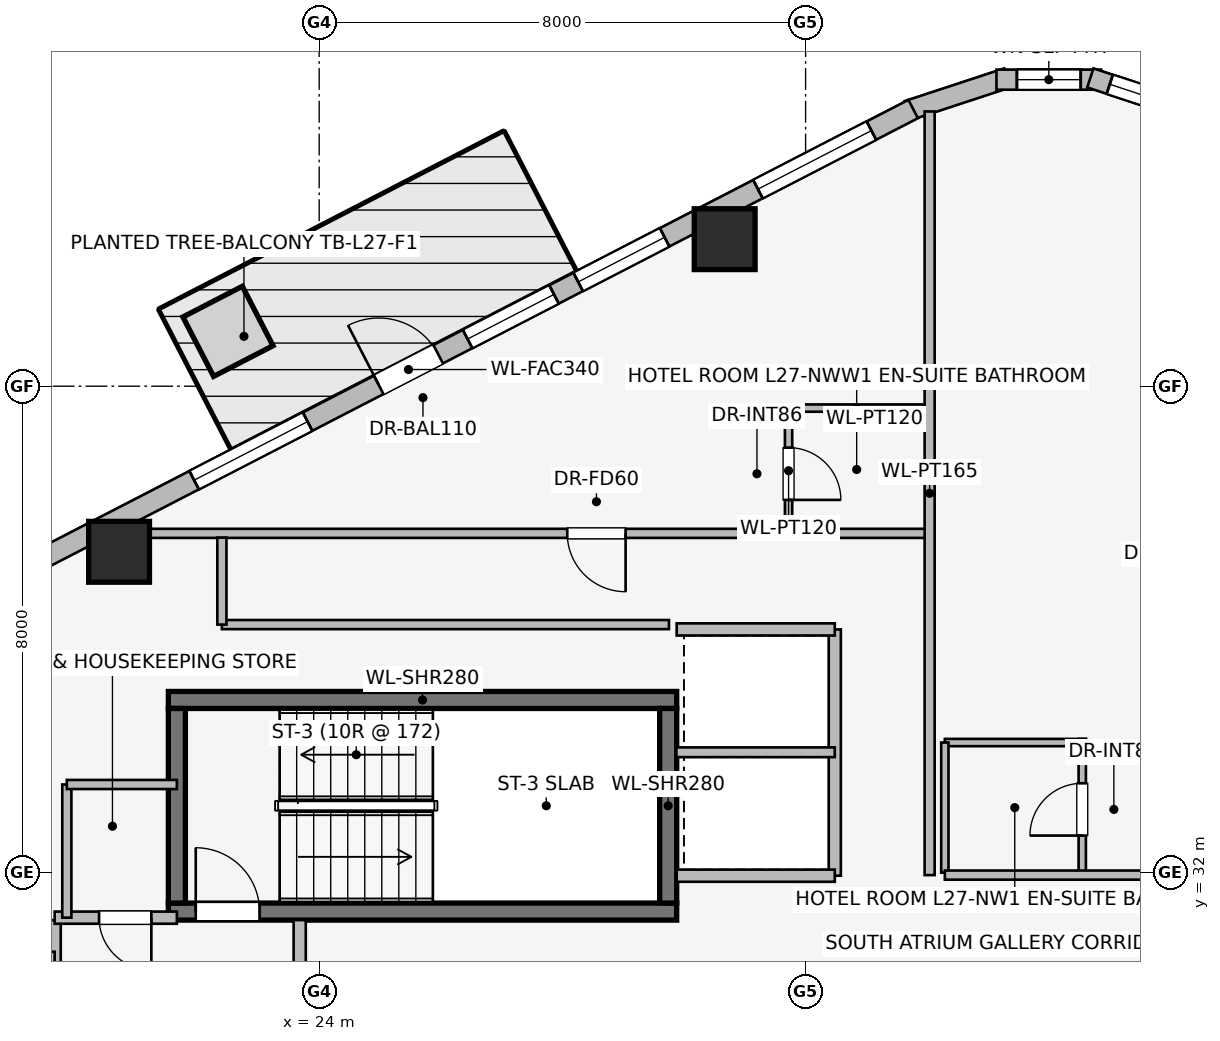
"""IFC4 building model, lengths in metres.
Left out: names, types, materials, properties, quantities, classifications, styles, units other than length and angle.
Written with IfcOpenShell. Run it as: python <this file> out.ifc"""

import sys

from ifc_helpers import new_model, si_unit, direction, frame, frame_2d, origin, origin_2d, place, context, subcontext, project, spatial, rectangle, extrude, element, fill, save


model = new_model("IFC4")
c1 = context("Model", 3, precision=1e-05, world=origin(), true_north=direction((0.0, 1.0)))
c2 = subcontext(c1, "Body", "Model", "MODEL_VIEW")
j1 = project(units=[si_unit("LENGTHUNIT", "METRE"), si_unit("PLANEANGLEUNIT", "RADIAN")], contexts=[c1])
p1 = place(None, origin())
s1 = spatial("IfcSite", under=j1, at=p1, CompositionType="ELEMENT")
p2 = place(p1, origin())
s2 = spatial("IfcBuilding", under=s1, at=p2, CompositionType="ELEMENT")
p3 = place(p2, frame((0.0, 0.0, 105.0)))
s3 = spatial("IfcBuildingStorey", under=s2, at=p3, CompositionType="ELEMENT", Elevation=105.0)
p4 = place(p3, frame((21.52, 31.36, 0.0), z_axis=(0.0, 0.0, 1.0), x_axis=(1.0, 0.0, 0.0)))
e1 = element("IfcWall", 1, at=p4, inside=s3, PredefinedType="SHEAR", context=c2, shape_type="SweptSolid", body=[
    extrude(rectangle(XDim=8.36, YDim=0.28, at=frame_2d((4.18, 0.0))), origin(), (0.0, 0.0, 1.0), 3.45),
])
p5 = place(p4, frame((0.45, 0.0, 0.0)))
e2 = element("IfcOpeningElement", 2, at=p5, cuts=e1, PredefinedType="OPENING", context=c2, shape_type="SweptSolid", body=[
    extrude(rectangle(XDim=1.05, YDim=2.0, at=frame_2d((0.525, 1.0))), frame((0.0, 0.15, 0.0), z_axis=(0.0, -1.0, 0.0), x_axis=(1.0, 0.0, 0.0)), (0.0, 0.0, 1.0), 0.3),
])
p6 = place(p3, frame((29.88, 34.84, 0.0), z_axis=(0.0, 0.0, 1.0), x_axis=(-1.0, 0.0, 0.0)))
e3 = element("IfcWall", 3, at=p6, inside=s3, PredefinedType="SHEAR", context=c2, shape_type="SweptSolid", body=[
    extrude(rectangle(XDim=8.36, YDim=0.28, at=frame_2d((4.18, 0.0))), origin(), (0.0, 0.0, 1.0), 3.45),
])
for number, where, z_axis, x_axis in (
    (4, (21.66, 34.7, 0.0), (0.0, 0.0, 1.0), (0.0, -1.0, 0.0)),
    (5, (29.74, 31.5, 0.0), (0.0, 0.0, 1.0), (0.0, 1.0, 0.0)),
):
    element("IfcWall", number, at=place(p3, frame(where, z_axis=z_axis, x_axis=x_axis)), inside=s3, PredefinedType="SHEAR", context=c2, shape_type="SweptSolid", body=[
        extrude(rectangle(XDim=3.2, YDim=0.28, at=frame_2d((1.6, 0.0))), origin(), (0.0, 0.0, 1.0), 3.45),
    ])
for number, where, z_axis, x_axis in (
    (6, (30.669, 42.418, 0.0), (0.0, 0.0, 1.0), (1.0, 0.0, 0.0)),
    (7, (20.709, 37.277, 0.0), (0.0, 0.0, 1.0), (1.0, 0.0, 0.0)),
):
    element("IfcColumn", number, at=place(p3, frame(where, z_axis=z_axis, x_axis=x_axis)), inside=s3, PredefinedType="COLUMN", context=c2, shape_type="SweptSolid", body=[
        extrude(rectangle(XDim=1.0, YDim=1.0, at=origin_2d()), origin(), (0.0, 0.0, 1.0), 3.45),
    ])
p7 = place(p3, frame((33.681, 44.532, 0.0), z_axis=(0.0, 0.0, 1.0), x_axis=(0.949937416267, 0.312440242569, 0.0)))
e8 = element("IfcWall", 8, at=p7, inside=s3, PredefinedType="STANDARD", context=c2, shape_type="SweptSolid", body=[
    extrude(rectangle(XDim=1.722, YDim=0.33, at=frame_2d((0.861, 0.0))), origin(), (0.0, 0.0, 1.0), 3.19),
])
p8 = place(p3, frame((35.139, 45.041, 0.0), z_axis=(0.0, 0.0, 1.0), x_axis=(1.0, 0.0, 0.0)))
e9 = element("IfcWall", 9, at=p8, inside=s3, PredefinedType="STANDARD", context=c2, shape_type="SweptSolid", body=[
    extrude(rectangle(XDim=1.722, YDim=0.33, at=frame_2d((0.861, 0.0))), origin(), (0.0, 0.0, 1.0), 3.19),
])
p9 = place(p8, frame((0.336, 0.0, 0.75)))
e10 = element("IfcOpeningElement", 10, at=p9, cuts=e9, PredefinedType="OPENING", context=c2, shape_type="SweptSolid", body=[
    extrude(rectangle(XDim=1.05, YDim=1.4, at=frame_2d((0.525, 0.7))), frame((0.0, 0.175, 0.0), z_axis=(0.0, -1.0, 0.0), x_axis=(1.0, 0.0, 0.0)), (0.0, 0.0, 1.0), 0.35),
])
p10 = place(p3, frame((36.683, 45.07, 0.0), z_axis=(0.0, 0.0, 1.0), x_axis=(0.949937416267, -0.312440242569, 0.0)))
e11 = element("IfcWall", 11, at=p10, inside=s3, PredefinedType="STANDARD", context=c2, shape_type="SweptSolid", body=[
    extrude(rectangle(XDim=1.722, YDim=0.33, at=frame_2d((0.861, 0.0))), origin(), (0.0, 0.0, 1.0), 3.19),
])
p11 = place(p10, frame((0.336, 0.0, 0.75)))
e12 = element("IfcOpeningElement", 12, at=p11, cuts=e11, PredefinedType="OPENING", context=c2, shape_type="SweptSolid", body=[
    extrude(rectangle(XDim=1.05, YDim=1.4, at=frame_2d((0.525, 0.7))), frame((0.0, 0.175, 0.0), z_axis=(0.0, -1.0, 0.0), x_axis=(1.0, 0.0, 0.0)), (0.0, 0.0, 1.0), 0.35),
])
p12 = place(p3, frame((17.169, 35.99, 0.0), z_axis=(0.0, 0.0, 1.0), x_axis=(0.888613612362, 0.458656568606, 0.0)))
e13 = element("IfcWall", 13, at=p12, inside=s3, PredefinedType="STANDARD", context=c2, shape_type="SweptSolid", body=[
    extrude(rectangle(XDim=18.681, YDim=0.34, at=frame_2d((9.34, 0.0))), origin(), (0.0, 0.0, 1.0), 3.19),
])
p13 = place(p12, frame((8.79, 0.0, 0.0)))
e14 = element("IfcOpeningElement", 14, at=p13, cuts=e13, PredefinedType="OPENING", context=c2, shape_type="SweptSolid", body=[
    extrude(rectangle(XDim=1.1, YDim=2.04, at=frame_2d((0.55, 1.02))), frame((0.0, 0.18, 0.0), z_axis=(0.0, -1.0, 0.0), x_axis=(1.0, 0.0, 0.0)), (0.0, 0.0, 1.0), 0.36),
])
p14 = place(p12, frame((1.023, 0.0, 0.75)))
e15 = element("IfcOpeningElement", 15, at=p14, cuts=e13, PredefinedType="OPENING", context=c2, shape_type="SweptSolid", body=[
    extrude(rectangle(XDim=1.6, YDim=1.55, at=frame_2d((0.8, 0.775))), frame((0.0, 0.18, 0.0), z_axis=(0.0, -1.0, 0.0), x_axis=(1.0, 0.0, 0.0)), (0.0, 0.0, 1.0), 0.36),
])
p15 = place(p12, frame((5.373, 0.0, 0.75)))
e16 = element("IfcOpeningElement", 16, at=p15, cuts=e13, PredefinedType="OPENING", context=c2, shape_type="SweptSolid", body=[
    extrude(rectangle(XDim=2.1, YDim=1.5, at=frame_2d((1.05, 0.75))), frame((0.0, 0.18, 0.0), z_axis=(0.0, -1.0, 0.0), x_axis=(1.0, 0.0, 0.0)), (0.0, 0.0, 1.0), 0.36),
])
p16 = place(p12, frame((10.434, 0.0, 0.75)))
e17 = element("IfcOpeningElement", 17, at=p16, cuts=e13, PredefinedType="OPENING", context=c2, shape_type="SweptSolid", body=[
    extrude(rectangle(XDim=1.6, YDim=1.55, at=frame_2d((0.8, 0.775))), frame((0.0, 0.18, 0.0), z_axis=(0.0, -1.0, 0.0), x_axis=(1.0, 0.0, 0.0)), (0.0, 0.0, 1.0), 0.36),
])
p17 = place(p12, frame((12.481, 0.0, 0.75)))
e18 = element("IfcOpeningElement", 18, at=p17, cuts=e13, PredefinedType="OPENING", context=c2, shape_type="SweptSolid", body=[
    extrude(rectangle(XDim=1.6, YDim=1.55, at=frame_2d((0.8, 0.775))), frame((0.0, 0.18, 0.0), z_axis=(0.0, -1.0, 0.0), x_axis=(1.0, 0.0, 0.0)), (0.0, 0.0, 1.0), 0.36),
])
p18 = place(p12, frame((15.808, 0.0, 0.75)))
e19 = element("IfcOpeningElement", 19, at=p18, cuts=e13, PredefinedType="OPENING", context=c2, shape_type="SweptSolid", body=[
    extrude(rectangle(XDim=2.1, YDim=1.5, at=frame_2d((1.05, 0.75))), frame((0.0, 0.18, 0.0), z_axis=(0.0, -1.0, 0.0), x_axis=(1.0, 0.0, 0.0)), (0.0, 0.0, 1.0), 0.36),
])
p19 = place(p3, frame((19.65, 25.68, 0.0), z_axis=(0.0, 0.0, 1.0), x_axis=(0.0, 1.0, 0.0)))
e20 = element("IfcWall", 20, at=p19, inside=s3, PredefinedType="PARTITIONING", context=c2, shape_type="SweptSolid", body=[
    extrude(rectangle(XDim=5.54, YDim=0.2, at=frame_2d((2.77, 0.0))), origin(), (0.0, 0.0, 1.0), 3.19),
])
p20 = place(p19, frame((0.62, 0.0, 0.0)))
e21 = element("IfcOpeningElement", 21, at=p20, cuts=e20, PredefinedType="OPENING", context=c2, shape_type="SweptSolid", body=[
    extrude(rectangle(XDim=1.1, YDim=2.2, at=frame_2d((0.55, 1.1))), frame((0.0, 0.11, 0.0), z_axis=(0.0, -1.0, 0.0), x_axis=(1.0, 0.0, 0.0)), (0.0, 0.0, 1.0), 0.22),
])
p21 = place(p19, frame((3.12, 0.0, 0.0)))
e22 = element("IfcOpeningElement", 22, at=p21, cuts=e20, PredefinedType="OPENING", context=c2, shape_type="SweptSolid", body=[
    extrude(rectangle(XDim=1.1, YDim=2.2, at=frame_2d((0.55, 1.1))), frame((0.0, 0.11, 0.0), z_axis=(0.0, -1.0, 0.0), x_axis=(1.0, 0.0, 0.0)), (0.0, 0.0, 1.0), 0.22),
])
p22 = place(p3, frame((23.68, 25.68, 0.0), z_axis=(0.0, 0.0, 1.0), x_axis=(0.0, 1.0, 0.0)))
e23 = element("IfcWall", 23, at=p22, inside=s3, PredefinedType="PARTITIONING", context=c2, shape_type="SweptSolid", body=[
    extrude(rectangle(XDim=5.54, YDim=0.2, at=frame_2d((2.77, 0.0))), origin(), (0.0, 0.0, 1.0), 3.19),
])
p23 = place(p22, frame((1.8, 0.0, 0.0)))
e24 = element("IfcOpeningElement", 24, at=p23, cuts=e23, PredefinedType="OPENING", context=c2, shape_type="SweptSolid", body=[
    extrude(rectangle(XDim=1.05, YDim=2.0, at=frame_2d((0.525, 1.0))), frame((0.0, 0.11, 0.0), z_axis=(0.0, -1.0, 0.0), x_axis=(1.0, 0.0, 0.0)), (0.0, 0.0, 1.0), 0.22),
])
p24 = place(p3, frame((21.66, 31.26, 0.0), z_axis=(0.0, 0.0, 1.0), x_axis=(-1.0, 0.0, 0.0)))
e25 = element("IfcWall", 25, at=p24, inside=s3, PredefinedType="PARTITIONING", context=c2, shape_type="SweptSolid", body=[
    extrude(rectangle(XDim=2.01, YDim=0.2, at=frame_2d((1.005, 0.0))), origin(), (0.0, 0.0, 1.0), 3.19),
])
p25 = place(p24, frame((0.42, 0.0, 0.0)))
e26 = element("IfcOpeningElement", 26, at=p25, cuts=e25, PredefinedType="OPENING", context=c2, shape_type="SweptSolid", body=[
    extrude(rectangle(XDim=0.86, YDim=2.0, at=frame_2d((0.43, 1.0))), frame((0.0, 0.11, 0.0), z_axis=(0.0, -1.0, 0.0), x_axis=(1.0, 0.0, 0.0)), (0.0, 0.0, 1.0), 0.22),
])
p26 = place(p3, frame((19.65, 30.6, 0.0), z_axis=(0.0, 0.0, 1.0), x_axis=(-1.0, 0.0, 0.0)))
e27 = element("IfcWall", 27, at=p26, inside=s3, PredefinedType="PARTITIONING", context=c2, shape_type="SweptSolid", body=[
    extrude(rectangle(XDim=2.5, YDim=0.2, at=frame_2d((1.25, 0.0))), origin(), (0.0, 0.0, 1.0), 2.09),
])
p27 = place(p3, frame((32.48, 31.95, 0.0), z_axis=(0.0, 0.0, 1.0), x_axis=(0.0, 1.0, 0.0)))
e28 = element("IfcWall", 28, at=p27, inside=s3, PredefinedType="PARTITIONING", context=c2, shape_type="SweptSolid", body=[
    extrude(rectangle(XDim=4.05, YDim=0.2, at=frame_2d((2.025, 0.0))), origin(), (0.0, 0.0, 1.0), 3.19),
])
for number, where, z_axis, x_axis in (
    (29, (29.88, 36.0, 0.0), (0.0, 0.0, 1.0), (1.0, 0.0, 0.0)),
    (30, (32.48, 31.95, 0.0), (0.0, 0.0, 1.0), (-1.0, 0.0, 0.0)),
):
    element("IfcWall", number, at=place(p3, frame(where, z_axis=z_axis, x_axis=x_axis)), inside=s3, PredefinedType="PARTITIONING", context=c2, shape_type="SweptSolid", body=[
        extrude(rectangle(XDim=2.6, YDim=0.2, at=frame_2d((1.3, 0.0))), origin(), (0.0, 0.0, 1.0), 3.19),
    ])
p28 = place(p3, frame((29.875, 33.98, 0.0), z_axis=(0.0, 0.0, 1.0), x_axis=(1.0, 0.0, 0.0)))
e31 = element("IfcWall", 31, at=p28, inside=s3, PredefinedType="PARTITIONING", context=c2, shape_type="SweptSolid", body=[
    extrude(rectangle(XDim=2.605, YDim=0.16, at=frame_2d((1.302, 0.0))), origin(), (0.0, 0.0, 1.0), 3.19),
])
p29 = place(p3, frame((19.85, 33.45, 0.0), z_axis=(0.0, 0.0, 1.0), x_axis=(0.0, -1.0, 0.0)))
e32 = element("IfcWall", 32, at=p29, inside=s3, PredefinedType="PARTITIONING", context=c2, shape_type="SweptSolid", body=[
    extrude(rectangle(XDim=2.19, YDim=0.15, at=frame_2d((1.095, 0.0))), origin(), (0.0, 0.0, 1.0), 3.19),
])
p30 = place(p3, frame((21.66, 33.45, 0.0), z_axis=(0.0, 0.0, 1.0), x_axis=(-1.0, 0.0, 0.0)))
e33 = element("IfcWall", 33, at=p30, inside=s3, PredefinedType="PARTITIONING", context=c2, shape_type="SweptSolid", body=[
    extrude(rectangle(XDim=1.81, YDim=0.15, at=frame_2d((0.905, 0.0))), origin(), (0.0, 0.0, 1.0), 3.19),
])
p31 = place(p3, frame((34.0, 39.64, 0.0), z_axis=(0.0, 0.0, 1.0), x_axis=(-1.0, 0.0, 0.0)))
e34 = element("IfcWall", 34, at=p31, inside=s3, PredefinedType="PARTITIONING", context=c2, shape_type="SweptSolid", body=[
    extrude(rectangle(XDim=2.34, YDim=0.12, at=frame_2d((1.17, 0.0))), origin(), (0.0, 0.0, 1.0), 3.19),
])
p32 = place(p3, frame((31.72, 39.64, 0.0), z_axis=(0.0, 0.0, 1.0), x_axis=(0.0, -1.0, 0.0)))
e35 = element("IfcWall", 35, at=p32, inside=s3, PredefinedType="PARTITIONING", context=c2, shape_type="SweptSolid", body=[
    extrude(rectangle(XDim=2.06, YDim=0.12, at=frame_2d((1.03, 0.0))), origin(), (0.0, 0.0, 1.0), 3.19),
])
p33 = place(p32, frame((0.65, 0.0, 0.0)))
e36 = element("IfcOpeningElement", 36, at=p33, cuts=e35, PredefinedType="OPENING", context=c2, shape_type="SweptSolid", body=[
    extrude(rectangle(XDim=0.86, YDim=2.0, at=frame_2d((0.43, 1.0))), frame((0.0, 0.07, 0.0), z_axis=(0.0, -1.0, 0.0), x_axis=(1.0, 0.0, 0.0)), (0.0, 0.0, 1.0), 0.14),
])
p34 = place(p3, frame((34.0, 37.58, 0.0), z_axis=(0.0, 0.0, 1.0), x_axis=(-1.0, 0.0, 0.0)))
e37 = element("IfcWall", 37, at=p34, inside=s3, PredefinedType="PARTITIONING", context=c2, shape_type="SweptSolid", body=[
    extrude(rectangle(XDim=13.707, YDim=0.15, at=frame_2d((6.854, 0.0))), origin(), (0.0, 0.0, 1.0), 2.582),
])
p35 = place(p34, frame((4.96, 0.0, 0.0)))
e38 = element("IfcOpeningElement", 38, at=p35, cuts=e37, PredefinedType="OPENING", context=c2, shape_type="SweptSolid", body=[
    extrude(rectangle(XDim=0.96, YDim=2.0, at=frame_2d((0.48, 1.0))), frame((0.0, 0.085, 0.0), z_axis=(0.0, -1.0, 0.0), x_axis=(1.0, 0.0, 0.0)), (0.0, 0.0, 1.0), 0.17),
])
p36 = place(p3, frame((34.04, 31.96, 0.0), z_axis=(0.0, 0.0, 1.0), x_axis=(0.0, 1.0, 0.0)))
e39 = element("IfcWall", 39, at=p36, inside=s3, PredefinedType="PARTITIONING", context=c2, shape_type="SweptSolid", body=[
    extrude(rectangle(XDim=12.558, YDim=0.165, at=frame_2d((6.279, 0.0))), origin(), (0.0, 0.0, 1.0), 3.19),
])
p37 = place(p3, frame((36.55, 31.96, 0.0), z_axis=(0.0, 0.0, 1.0), x_axis=(0.0, 1.0, 0.0)))
e40 = element("IfcWall", 40, at=p37, inside=s3, PredefinedType="PARTITIONING", context=c2, shape_type="SweptSolid", body=[
    extrude(rectangle(XDim=2.24, YDim=0.12, at=frame_2d((1.12, 0.0))), origin(), (0.0, 0.0, 1.0), 3.19),
])
p38 = place(p37, frame((0.65, 0.0, 0.0)))
e41 = element("IfcOpeningElement", 41, at=p38, cuts=e40, PredefinedType="OPENING", context=c2, shape_type="SweptSolid", body=[
    extrude(rectangle(XDim=0.86, YDim=2.0, at=frame_2d((0.43, 1.0))), frame((0.0, 0.07, 0.0), z_axis=(0.0, -1.0, 0.0), x_axis=(1.0, 0.0, 0.0)), (0.0, 0.0, 1.0), 0.14),
])
p39 = place(p3, frame((36.61, 34.14, 0.0), z_axis=(0.0, 0.0, 1.0), x_axis=(-1.0, 0.0, 0.0)))
e42 = element("IfcWall", 42, at=p39, inside=s3, PredefinedType="PARTITIONING", context=c2, shape_type="SweptSolid", body=[
    extrude(rectangle(XDim=2.32, YDim=0.12, at=frame_2d((1.16, 0.0))), origin(), (0.0, 0.0, 1.0), 3.19),
])
p40 = place(p3, frame((34.29, 34.14, 0.0), z_axis=(0.0, 0.0, 1.0), x_axis=(0.0, -1.0, 0.0)))
e43 = element("IfcWall", 43, at=p40, inside=s3, PredefinedType="PARTITIONING", context=c2, shape_type="SweptSolid", body=[
    extrude(rectangle(XDim=2.14, YDim=0.12, at=frame_2d((1.07, 0.0))), origin(), (0.0, 0.0, 1.0), 3.19),
])
p41 = place(p3, frame((45.494, 31.96, 0.0), z_axis=(0.0, 0.0, 1.0), x_axis=(-1.0, 0.0, 0.0)))
e44 = element("IfcWall", 44, at=p41, inside=s3, PredefinedType="PARTITIONING", context=c2, shape_type="SweptSolid", body=[
    extrude(rectangle(XDim=11.204, YDim=0.15, at=frame_2d((5.602, 0.0))), origin(), (0.0, 0.0, 1.0), 3.19),
])
p42 = place(p41, frame((3.903, 0.0, 0.0)))
e45 = element("IfcOpeningElement", 45, at=p42, cuts=e44, PredefinedType="OPENING", context=c2, shape_type="SweptSolid", body=[
    extrude(rectangle(XDim=0.96, YDim=2.0, at=frame_2d((0.48, 1.0))), frame((0.0, 0.085, 0.0), z_axis=(0.0, -1.0, 0.0), x_axis=(1.0, 0.0, 0.0)), (0.0, 0.0, 1.0), 0.17),
])
p43 = place(p3, frame((29.753, 36.08, 0.0), z_axis=(0.0, 0.0, 1.0), x_axis=(-1.0, 0.0, 0.0)))
e46 = element("IfcWall", 46, at=p43, inside=s3, PredefinedType="PARTITIONING", context=c2, shape_type="SweptSolid", body=[
    extrude(rectangle(XDim=7.353, YDim=0.15, at=frame_2d((3.677, 0.0))), origin(), (0.0, 0.0, 1.0), 2.582),
])
p44 = place(p3, frame((22.4, 36.08, 0.0), z_axis=(0.0, 0.0, 1.0), x_axis=(0.0, 1.0, 0.0)))
e47 = element("IfcWall", 47, at=p44, inside=s3, PredefinedType="PARTITIONING", context=c2, shape_type="SweptSolid", body=[
    extrude(rectangle(XDim=1.43, YDim=0.15, at=frame_2d((0.715, 0.0))), origin(), (0.0, 0.0, 1.0), 3.19),
])
p45 = place(p9, origin())
e48 = element("IfcWindow", 48, at=p45, inside=s3, PartitioningType="SINGLE_PANEL", PredefinedType="WINDOW", context=c2, shape_type="SweptSolid", body=[
    extrude(rectangle(XDim=1.05, YDim=1.4, at=frame_2d((0.525, 0.7))), frame((0.0, 0.03, 0.0), z_axis=(0.0, -1.0, 0.0), x_axis=(1.0, 0.0, 0.0)), (0.0, 0.0, 1.0), 0.06),
])
fill(e10, e48)
p46 = place(p11, origin())
e49 = element("IfcWindow", 49, at=p46, inside=s3, PartitioningType="SINGLE_PANEL", PredefinedType="WINDOW", context=c2, shape_type="SweptSolid", body=[
    extrude(rectangle(XDim=1.05, YDim=1.4, at=frame_2d((0.525, 0.7))), frame((0.0, 0.03, 0.0), z_axis=(0.0, -1.0, 0.0), x_axis=(1.0, 0.0, 0.0)), (0.0, 0.0, 1.0), 0.06),
])
fill(e12, e49)
p47 = place(p13, origin())
e50 = element("IfcDoor", 50, at=p47, inside=s3, OperationType="SINGLE_SWING_LEFT", PredefinedType="DOOR", context=c2, shape_type="SweptSolid", body=[
    extrude(rectangle(XDim=1.1, YDim=2.04, at=frame_2d((0.55, 1.02))), frame((0.0, 0.025, 0.0), z_axis=(0.0, -1.0, 0.0), x_axis=(1.0, 0.0, 0.0)), (0.0, 0.0, 1.0), 0.05),
])
fill(e14, e50)
p48 = place(p15, origin())
e51 = element("IfcWindow", 51, at=p48, inside=s3, PartitioningType="SINGLE_PANEL", PredefinedType="WINDOW", context=c2, shape_type="SweptSolid", body=[
    extrude(rectangle(XDim=2.1, YDim=1.5, at=frame_2d((1.05, 0.75))), frame((0.0, 0.03, 0.0), z_axis=(0.0, -1.0, 0.0), x_axis=(1.0, 0.0, 0.0)), (0.0, 0.0, 1.0), 0.06),
])
fill(e16, e51)
p49 = place(p16, origin())
e52 = element("IfcWindow", 52, at=p49, inside=s3, PartitioningType="SINGLE_PANEL", PredefinedType="WINDOW", context=c2, shape_type="SweptSolid", body=[
    extrude(rectangle(XDim=1.6, YDim=1.55, at=frame_2d((0.8, 0.775))), frame((0.0, 0.03, 0.0), z_axis=(0.0, -1.0, 0.0), x_axis=(1.0, 0.0, 0.0)), (0.0, 0.0, 1.0), 0.06),
])
fill(e17, e52)
p50 = place(p17, origin())
e53 = element("IfcWindow", 53, at=p50, inside=s3, PartitioningType="SINGLE_PANEL", PredefinedType="WINDOW", context=c2, shape_type="SweptSolid", body=[
    extrude(rectangle(XDim=1.6, YDim=1.55, at=frame_2d((0.8, 0.775))), frame((0.0, 0.03, 0.0), z_axis=(0.0, -1.0, 0.0), x_axis=(1.0, 0.0, 0.0)), (0.0, 0.0, 1.0), 0.06),
])
fill(e18, e53)
p51 = place(p18, origin())
e54 = element("IfcWindow", 54, at=p51, inside=s3, PartitioningType="SINGLE_PANEL", PredefinedType="WINDOW", context=c2, shape_type="SweptSolid", body=[
    extrude(rectangle(XDim=2.1, YDim=1.5, at=frame_2d((1.05, 0.75))), frame((0.0, 0.03, 0.0), z_axis=(0.0, -1.0, 0.0), x_axis=(1.0, 0.0, 0.0)), (0.0, 0.0, 1.0), 0.06),
])
fill(e19, e54)
p52 = place(p5, origin())
e55 = element("IfcDoor", 55, at=p52, inside=s3, OperationType="SINGLE_SWING_LEFT", PredefinedType="DOOR", context=c2, shape_type="SweptSolid", body=[
    extrude(rectangle(XDim=1.05, YDim=2.0, at=frame_2d((0.525, 1.0))), frame((0.0, 0.025, 0.0), z_axis=(0.0, -1.0, 0.0), x_axis=(1.0, 0.0, 0.0)), (0.0, 0.0, 1.0), 0.05),
])
fill(e2, e55)
p53 = place(p25, origin())
e56 = element("IfcDoor", 56, at=p53, inside=s3, OperationType="SINGLE_SWING_LEFT", PredefinedType="DOOR", context=c2, shape_type="SweptSolid", body=[
    extrude(rectangle(XDim=0.86, YDim=2.0, at=frame_2d((0.43, 1.0))), frame((0.0, 0.025, 0.0), z_axis=(0.0, -1.0, 0.0), x_axis=(1.0, 0.0, 0.0)), (0.0, 0.0, 1.0), 0.05),
])
fill(e26, e56)
p54 = place(p33, origin())
e57 = element("IfcDoor", 57, at=p54, inside=s3, OperationType="SINGLE_SWING_RIGHT", PredefinedType="DOOR", context=c2, shape_type="SweptSolid", body=[
    extrude(rectangle(XDim=0.86, YDim=2.0, at=frame_2d((0.43, 1.0))), frame((0.0, 0.025, 0.0), z_axis=(0.0, -1.0, 0.0), x_axis=(1.0, 0.0, 0.0)), (0.0, 0.0, 1.0), 0.05),
])
fill(e36, e57)
p55 = place(p35, origin())
e58 = element("IfcDoor", 58, at=p55, inside=s3, OperationType="SINGLE_SWING_LEFT", PredefinedType="DOOR", context=c2, shape_type="SweptSolid", body=[
    extrude(rectangle(XDim=0.96, YDim=2.0, at=frame_2d((0.48, 1.0))), frame((0.0, 0.025, 0.0), z_axis=(0.0, -1.0, 0.0), x_axis=(1.0, 0.0, 0.0)), (0.0, 0.0, 1.0), 0.05),
])
fill(e38, e58)
p56 = place(p38, origin())
e59 = element("IfcDoor", 59, at=p56, inside=s3, OperationType="SINGLE_SWING_LEFT", PredefinedType="DOOR", context=c2, shape_type="SweptSolid", body=[
    extrude(rectangle(XDim=0.86, YDim=2.0, at=frame_2d((0.43, 1.0))), frame((0.0, 0.025, 0.0), z_axis=(0.0, -1.0, 0.0), x_axis=(1.0, 0.0, 0.0)), (0.0, 0.0, 1.0), 0.05),
])
fill(e41, e59)
save(model, sys.argv[1])
